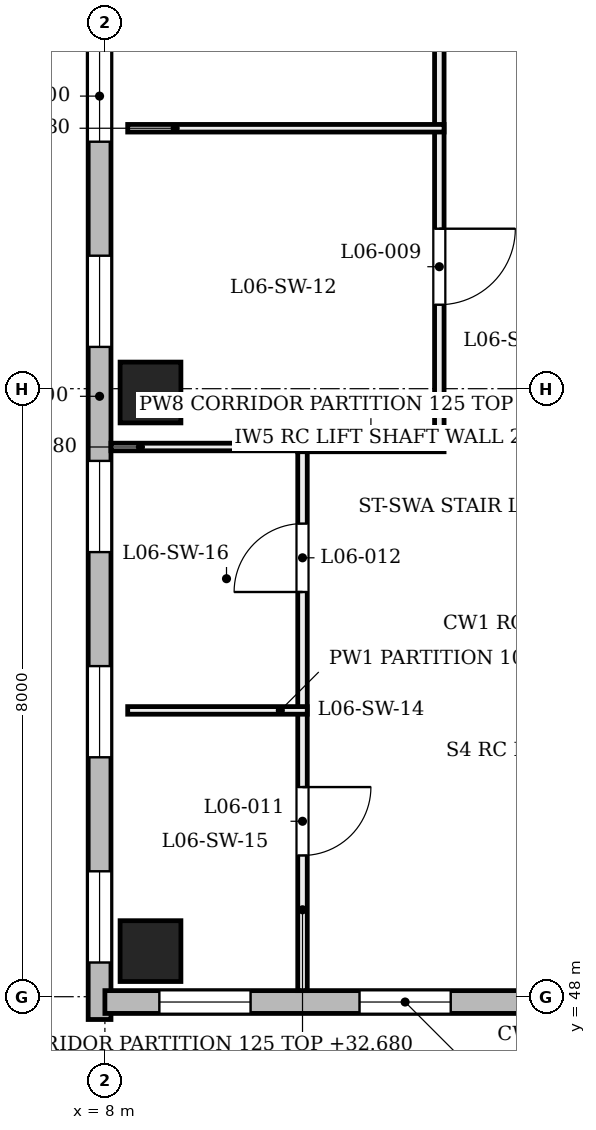
"""IFC4 building model, lengths in metres.
Left out: names, types, materials, properties, quantities, classifications, styles, units other than length and angle.
Written with IfcOpenShell. Run it as: python <this file> out.ifc"""

import sys

from ifc_helpers import new_model, si_unit, direction, frame, frame_2d, origin, origin_2d, place, context, subcontext, project, spatial, rectangle, extrude, element, fill, save


model = new_model("IFC4")
c1 = context("Model", 3, precision=1e-05, world=origin(), true_north=direction((0.0, 1.0)))
c2 = subcontext(c1, "Body", "Model", "MODEL_VIEW")
j1 = project(units=[si_unit("LENGTHUNIT", "METRE"), si_unit("PLANEANGLEUNIT", "RADIAN")], contexts=[c1])
p1 = place(None, origin())
s1 = spatial("IfcSite", under=j1, at=p1, CompositionType="ELEMENT")
p2 = place(p1, origin())
s2 = spatial("IfcBuilding", under=s1, at=p2, CompositionType="ELEMENT")
p3 = place(p2, frame((0.0, 0.0, 28.8)))
s3 = spatial("IfcBuildingStorey", under=s2, at=p3, CompositionType="ELEMENT", Elevation=28.8)
for number, where, z_axis, x_axis in (
    (1, (8.6, 48.6, 0.0), (0.0, 0.0, 1.0), (1.0, 0.0, 0.0)),
    (2, (8.6, 55.95, 0.0), (0.0, 0.0, 1.0), (1.0, 0.0, 0.0)),
):
    element("IfcColumn", number, at=place(p3, frame(where, z_axis=z_axis, x_axis=x_axis)), inside=s3, PredefinedType="COLUMN", context=c2, shape_type="SweptSolid", body=[
        extrude(rectangle(XDim=0.8, YDim=0.8, at=origin_2d()), origin(), (0.0, 0.0, 1.0), 4.58),
    ])
p4 = place(p3, frame((7.93, 47.7, 0.0), z_axis=(0.0, 0.0, 1.0), x_axis=(0.0, 1.0, 0.0)))
e3 = element("IfcWall", 3, at=p4, inside=s3, PredefinedType="SOLIDWALL", context=c2, shape_type="SweptSolid", body=[
    extrude(rectangle(XDim=16.4, YDim=0.3, at=frame_2d((8.2, 0.0))), origin(), (0.0, 0.0, 1.0), 3.9),
])
p5 = place(p4, frame((0.75, 0.0, 1.0)))
e4 = element("IfcOpeningElement", 4, at=p5, cuts=e3, PredefinedType="OPENING", context=c2, shape_type="SweptSolid", body=[
    extrude(rectangle(XDim=1.2, YDim=2.4, at=frame_2d((0.6, 1.2))), frame((0.0, 0.16, 0.0), z_axis=(0.0, -1.0, 0.0), x_axis=(1.0, 0.0, 0.0)), (0.0, 0.0, 1.0), 0.32),
])
p6 = place(p4, frame((3.45, 0.0, 1.0)))
e5 = element("IfcOpeningElement", 5, at=p6, cuts=e3, PredefinedType="OPENING", context=c2, shape_type="SweptSolid", body=[
    extrude(rectangle(XDim=1.2, YDim=2.4, at=frame_2d((0.6, 1.2))), frame((0.0, 0.16, 0.0), z_axis=(0.0, -1.0, 0.0), x_axis=(1.0, 0.0, 0.0)), (0.0, 0.0, 1.0), 0.32),
])
p7 = place(p4, frame((6.15, 0.0, 1.0)))
e6 = element("IfcOpeningElement", 6, at=p7, cuts=e3, PredefinedType="OPENING", context=c2, shape_type="SweptSolid", body=[
    extrude(rectangle(XDim=1.2, YDim=2.4, at=frame_2d((0.6, 1.2))), frame((0.0, 0.16, 0.0), z_axis=(0.0, -1.0, 0.0), x_axis=(1.0, 0.0, 0.0)), (0.0, 0.0, 1.0), 0.32),
])
p8 = place(p4, frame((8.85, 0.0, 1.0)))
e7 = element("IfcOpeningElement", 7, at=p8, cuts=e3, PredefinedType="OPENING", context=c2, shape_type="SweptSolid", body=[
    extrude(rectangle(XDim=1.2, YDim=2.4, at=frame_2d((0.6, 1.2))), frame((0.0, 0.16, 0.0), z_axis=(0.0, -1.0, 0.0), x_axis=(1.0, 0.0, 0.0)), (0.0, 0.0, 1.0), 0.32),
])
p9 = place(p4, frame((11.55, 0.0, 1.0)))
e8 = element("IfcOpeningElement", 8, at=p9, cuts=e3, PredefinedType="OPENING", context=c2, shape_type="SweptSolid", body=[
    extrude(rectangle(XDim=1.2, YDim=2.4, at=frame_2d((0.6, 1.2))), frame((0.0, 0.16, 0.0), z_axis=(0.0, -1.0, 0.0), x_axis=(1.0, 0.0, 0.0)), (0.0, 0.0, 1.0), 0.32),
])
p10 = place(p4, frame((14.25, 0.0, 1.0)))
e9 = element("IfcOpeningElement", 9, at=p10, cuts=e3, PredefinedType="OPENING", context=c2, shape_type="SweptSolid", body=[
    extrude(rectangle(XDim=1.2, YDim=2.4, at=frame_2d((0.6, 1.2))), frame((0.0, 0.16, 0.0), z_axis=(0.0, -1.0, 0.0), x_axis=(1.0, 0.0, 0.0)), (0.0, 0.0, 1.0), 0.32),
])
p11 = place(p3, frame((8.0, 47.93, 0.0), z_axis=(0.0, 0.0, 1.0), x_axis=(1.0, 0.0, 0.0)))
e10 = element("IfcWall", 10, at=p11, inside=s3, PredefinedType="SOLIDWALL", context=c2, shape_type="SweptSolid", body=[
    extrude(rectangle(XDim=7.9, YDim=0.3, at=frame_2d((3.95, 0.0))), origin(), (0.0, 0.0, 1.0), 3.9),
])
p12 = place(p11, frame((0.717, 0.0, 1.0)))
e11 = element("IfcOpeningElement", 11, at=p12, cuts=e10, PredefinedType="OPENING", context=c2, shape_type="SweptSolid", body=[
    extrude(rectangle(XDim=1.2, YDim=2.4, at=frame_2d((0.6, 1.2))), frame((0.0, 0.16, 0.0), z_axis=(0.0, -1.0, 0.0), x_axis=(1.0, 0.0, 0.0)), (0.0, 0.0, 1.0), 0.32),
])
p13 = place(p11, frame((3.35, 0.0, 1.0)))
e12 = element("IfcOpeningElement", 12, at=p13, cuts=e10, PredefinedType="OPENING", context=c2, shape_type="SweptSolid", body=[
    extrude(rectangle(XDim=1.2, YDim=2.4, at=frame_2d((0.6, 1.2))), frame((0.0, 0.16, 0.0), z_axis=(0.0, -1.0, 0.0), x_axis=(1.0, 0.0, 0.0)), (0.0, 0.0, 1.0), 0.32),
])
p14 = place(p11, frame((5.983, 0.0, 1.0)))
e13 = element("IfcOpeningElement", 13, at=p14, cuts=e10, PredefinedType="OPENING", context=c2, shape_type="SweptSolid", body=[
    extrude(rectangle(XDim=1.2, YDim=2.4, at=frame_2d((0.6, 1.2))), frame((0.0, 0.16, 0.0), z_axis=(0.0, -1.0, 0.0), x_axis=(1.0, 0.0, 0.0)), (0.0, 0.0, 1.0), 0.32),
])
p15 = place(p3, frame((12.4, 55.296, 0.0), z_axis=(0.0, 0.0, 1.0), x_axis=(0.0, 1.0, 0.0)))
e14 = element("IfcWall", 14, at=p15, inside=s3, PredefinedType="PARTITIONING", context=c2, shape_type="SweptSolid", body=[
    extrude(rectangle(XDim=8.604, YDim=0.125, at=frame_2d((4.302, 0.0))), origin(), (0.0, 0.0, 1.0), 3.88),
])
p16 = place(p15, frame((1.809, 0.0, 0.0)))
e15 = element("IfcOpeningElement", 15, at=p16, cuts=e14, PredefinedType="OPENING", context=c2, shape_type="SweptSolid", body=[
    extrude(rectangle(XDim=1.0, YDim=2.1, at=frame_2d((0.5, 1.05))), frame((0.0, 0.073, 0.0), z_axis=(0.0, -1.0, 0.0), x_axis=(1.0, 0.0, 0.0)), (0.0, 0.0, 1.0), 0.145),
])
p17 = place(p15, frame((6.143, 0.0, 0.0)))
e16 = element("IfcOpeningElement", 16, at=p17, cuts=e14, PredefinedType="OPENING", context=c2, shape_type="SweptSolid", body=[
    extrude(rectangle(XDim=1.0, YDim=2.1, at=frame_2d((0.5, 1.05))), frame((0.0, 0.073, 0.0), z_axis=(0.0, -1.0, 0.0), x_axis=(1.0, 0.0, 0.0)), (0.0, 0.0, 1.0), 0.145),
])
p18 = place(p3, frame((8.08, 55.233, 0.0), z_axis=(0.0, 0.0, 1.0), x_axis=(1.0, 0.0, 0.0)))
e17 = element("IfcWall", 17, at=p18, inside=s3, PredefinedType="PARTITIONING", context=c2, shape_type="SweptSolid", body=[
    extrude(rectangle(XDim=2.583, YDim=0.1, at=frame_2d((1.291, 0.0))), origin(), (0.0, 0.0, 1.0), 3.88),
])
p19 = place(p3, frame((10.538, 55.233, 0.0), z_axis=(0.0, 0.0, 1.0), x_axis=(1.0, 0.0, 0.0)))
e18 = element("IfcWall", 18, at=p19, inside=s3, PredefinedType="PARTITIONING", context=c2, shape_type="SweptSolid", body=[
    extrude(rectangle(XDim=1.925, YDim=0.125, at=frame_2d((0.962, 0.0))), origin(), (0.0, 0.0, 1.0), 4.56),
])
p20 = place(p3, frame((8.3, 59.427, 0.0), z_axis=(0.0, 0.0, 1.0), x_axis=(1.0, 0.0, 0.0)))
e19 = element("IfcWall", 19, at=p20, inside=s3, PredefinedType="PARTITIONING", context=c2, shape_type="SweptSolid", body=[
    extrude(rectangle(XDim=4.162, YDim=0.1, at=frame_2d((2.081, 0.0))), origin(), (0.0, 0.0, 1.0), 3.98),
])
p21 = place(p3, frame((10.6, 48.08, 0.0), z_axis=(0.0, 0.0, 1.0), x_axis=(0.0, 1.0, 0.0)))
e20 = element("IfcWall", 20, at=p21, inside=s3, PredefinedType="PARTITIONING", context=c2, shape_type="SweptSolid", body=[
    extrude(rectangle(XDim=7.091, YDim=0.125, at=frame_2d((3.545, 0.0))), origin(), (0.0, 0.0, 1.0), 3.88),
])
p22 = place(p21, frame((1.778, 0.0, 0.0)))
e21 = element("IfcOpeningElement", 21, at=p22, cuts=e20, PredefinedType="OPENING", context=c2, shape_type="SweptSolid", body=[
    extrude(rectangle(XDim=0.9, YDim=2.1, at=frame_2d((0.45, 1.05))), frame((0.0, 0.073, 0.0), z_axis=(0.0, -1.0, 0.0), x_axis=(1.0, 0.0, 0.0)), (0.0, 0.0, 1.0), 0.145),
])
p23 = place(p21, frame((5.245, 0.0, 0.0)))
e22 = element("IfcOpeningElement", 22, at=p23, cuts=e20, PredefinedType="OPENING", context=c2, shape_type="SweptSolid", body=[
    extrude(rectangle(XDim=0.9, YDim=2.1, at=frame_2d((0.45, 1.05))), frame((0.0, 0.073, 0.0), z_axis=(0.0, -1.0, 0.0), x_axis=(1.0, 0.0, 0.0)), (0.0, 0.0, 1.0), 0.145),
])
p24 = place(p3, frame((8.3, 51.767, 0.0), z_axis=(0.0, 0.0, 1.0), x_axis=(1.0, 0.0, 0.0)))
e23 = element("IfcWall", 23, at=p24, inside=s3, PredefinedType="PARTITIONING", context=c2, shape_type="SweptSolid", body=[
    extrude(rectangle(XDim=2.363, YDim=0.1, at=frame_2d((1.181, 0.0))), origin(), (0.0, 0.0, 1.0), 3.98),
])
p25 = place(p5, origin())
e24 = element("IfcWindow", 24, at=p25, inside=s3, PartitioningType="SINGLE_PANEL", PredefinedType="WINDOW", context=c2, shape_type="SweptSolid", body=[
    extrude(rectangle(XDim=1.2, YDim=2.4, at=frame_2d((0.6, 1.2))), frame((0.0, 0.03, 0.0), z_axis=(0.0, -1.0, 0.0), x_axis=(1.0, 0.0, 0.0)), (0.0, 0.0, 1.0), 0.06),
])
fill(e4, e24)
p26 = place(p6, origin())
e25 = element("IfcWindow", 25, at=p26, inside=s3, PartitioningType="SINGLE_PANEL", PredefinedType="WINDOW", context=c2, shape_type="SweptSolid", body=[
    extrude(rectangle(XDim=1.2, YDim=2.4, at=frame_2d((0.6, 1.2))), frame((0.0, 0.03, 0.0), z_axis=(0.0, -1.0, 0.0), x_axis=(1.0, 0.0, 0.0)), (0.0, 0.0, 1.0), 0.06),
])
fill(e5, e25)
p27 = place(p7, origin())
e26 = element("IfcWindow", 26, at=p27, inside=s3, PartitioningType="SINGLE_PANEL", PredefinedType="WINDOW", context=c2, shape_type="SweptSolid", body=[
    extrude(rectangle(XDim=1.2, YDim=2.4, at=frame_2d((0.6, 1.2))), frame((0.0, 0.03, 0.0), z_axis=(0.0, -1.0, 0.0), x_axis=(1.0, 0.0, 0.0)), (0.0, 0.0, 1.0), 0.06),
])
fill(e6, e26)
p28 = place(p8, origin())
e27 = element("IfcWindow", 27, at=p28, inside=s3, PartitioningType="SINGLE_PANEL", PredefinedType="WINDOW", context=c2, shape_type="SweptSolid", body=[
    extrude(rectangle(XDim=1.2, YDim=2.4, at=frame_2d((0.6, 1.2))), frame((0.0, 0.03, 0.0), z_axis=(0.0, -1.0, 0.0), x_axis=(1.0, 0.0, 0.0)), (0.0, 0.0, 1.0), 0.06),
])
fill(e7, e27)
p29 = place(p9, origin())
e28 = element("IfcWindow", 28, at=p29, inside=s3, PartitioningType="SINGLE_PANEL", PredefinedType="WINDOW", context=c2, shape_type="SweptSolid", body=[
    extrude(rectangle(XDim=1.2, YDim=2.4, at=frame_2d((0.6, 1.2))), frame((0.0, 0.03, 0.0), z_axis=(0.0, -1.0, 0.0), x_axis=(1.0, 0.0, 0.0)), (0.0, 0.0, 1.0), 0.06),
])
fill(e8, e28)
p30 = place(p12, origin())
e29 = element("IfcWindow", 29, at=p30, inside=s3, PartitioningType="SINGLE_PANEL", PredefinedType="WINDOW", context=c2, shape_type="SweptSolid", body=[
    extrude(rectangle(XDim=1.2, YDim=2.4, at=frame_2d((0.6, 1.2))), frame((0.0, 0.03, 0.0), z_axis=(0.0, -1.0, 0.0), x_axis=(1.0, 0.0, 0.0)), (0.0, 0.0, 1.0), 0.06),
])
fill(e11, e29)
p31 = place(p13, origin())
e30 = element("IfcWindow", 30, at=p31, inside=s3, PartitioningType="SINGLE_PANEL", PredefinedType="WINDOW", context=c2, shape_type="SweptSolid", body=[
    extrude(rectangle(XDim=1.2, YDim=2.4, at=frame_2d((0.6, 1.2))), frame((0.0, 0.03, 0.0), z_axis=(0.0, -1.0, 0.0), x_axis=(1.0, 0.0, 0.0)), (0.0, 0.0, 1.0), 0.06),
])
fill(e12, e30)
p32 = place(p16, origin())
e31 = element("IfcDoor", 31, at=p32, inside=s3, OperationType="SINGLE_SWING_RIGHT", PredefinedType="DOOR", context=c2, shape_type="SweptSolid", body=[
    extrude(rectangle(XDim=1.0, YDim=2.1, at=frame_2d((0.5, 1.05))), frame((0.0, 0.025, 0.0), z_axis=(0.0, -1.0, 0.0), x_axis=(1.0, 0.0, 0.0)), (0.0, 0.0, 1.0), 0.05),
])
fill(e15, e31)
p33 = place(p22, origin())
e32 = element("IfcDoor", 32, at=p33, inside=s3, OperationType="SINGLE_SWING_RIGHT", PredefinedType="DOOR", context=c2, shape_type="SweptSolid", body=[
    extrude(rectangle(XDim=0.9, YDim=2.1, at=frame_2d((0.45, 1.05))), frame((0.0, 0.025, 0.0), z_axis=(0.0, -1.0, 0.0), x_axis=(1.0, 0.0, 0.0)), (0.0, 0.0, 1.0), 0.05),
])
fill(e21, e32)
p34 = place(p23, origin())
e33 = element("IfcDoor", 33, at=p34, inside=s3, OperationType="SINGLE_SWING_LEFT", PredefinedType="DOOR", context=c2, shape_type="SweptSolid", body=[
    extrude(rectangle(XDim=0.9, YDim=2.1, at=frame_2d((0.45, 1.05))), frame((0.0, 0.025, 0.0), z_axis=(0.0, -1.0, 0.0), x_axis=(1.0, 0.0, 0.0)), (0.0, 0.0, 1.0), 0.05),
])
fill(e22, e33)
save(model, sys.argv[1])
